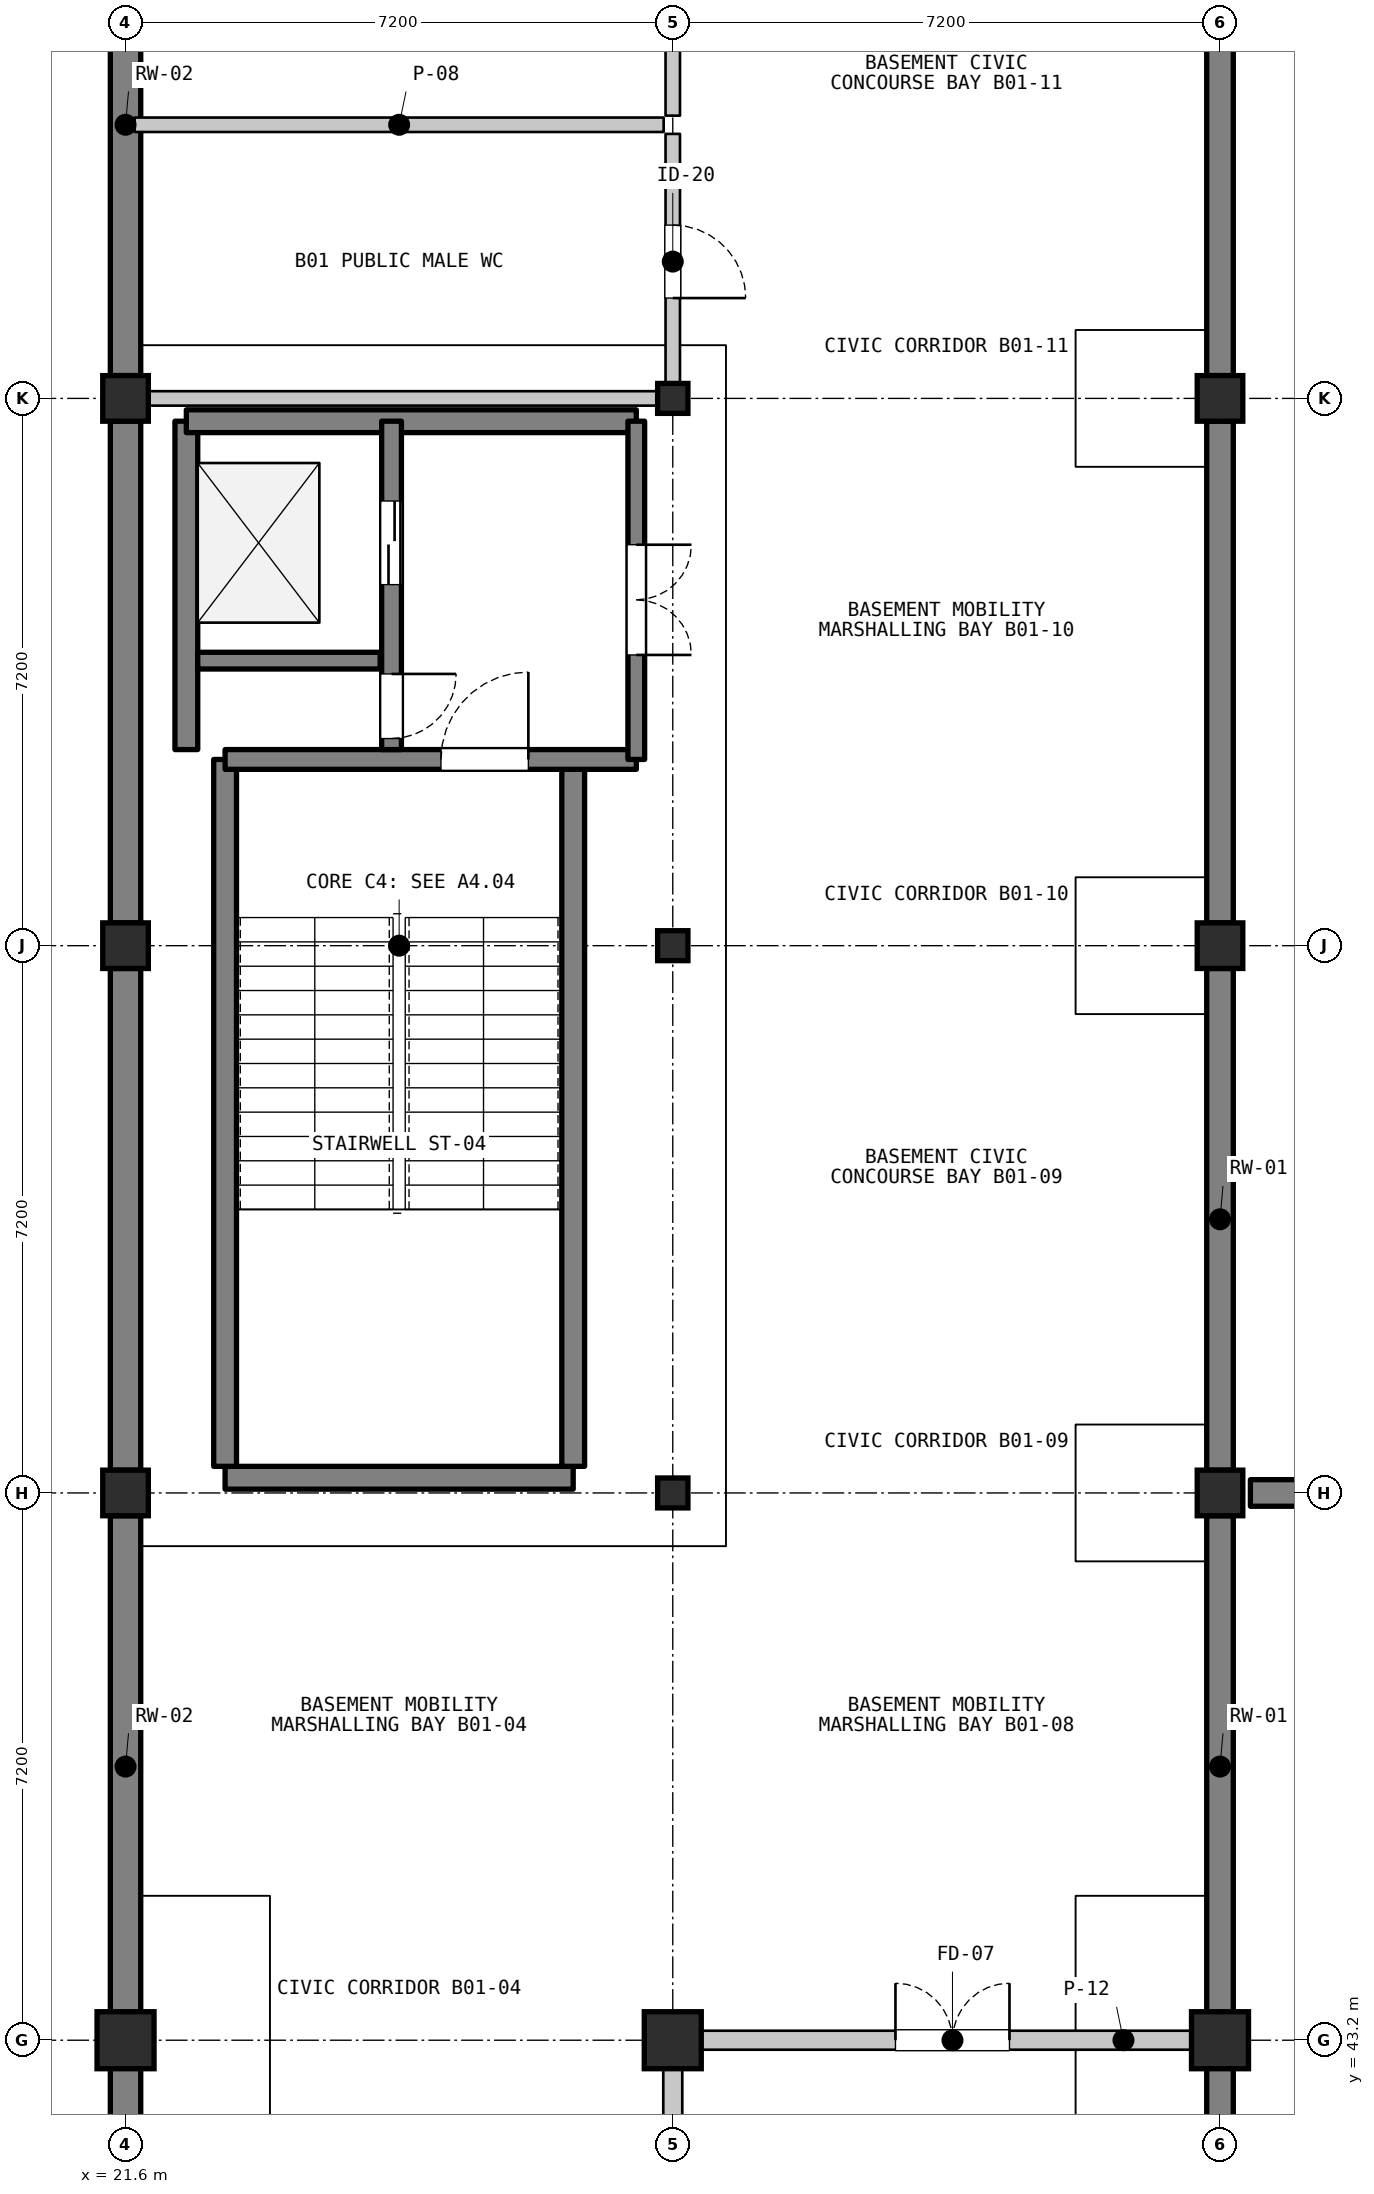
"""IFC4 building model, lengths in metres.
Left out: names, types, materials, properties, quantities, classifications, styles, units other than length and angle.
Written with IfcOpenShell. Run it as: python <this file> out.ifc"""

import sys

from ifc_helpers import new_model, si_unit, direction, frame, frame_2d, origin, origin_2d, place, context, subcontext, project, spatial, rectangle, i_section, extrude, element, fill, save


model = new_model("IFC4")
c1 = context("Model", 3, precision=1e-05, world=origin(), true_north=direction((0.0, 1.0)))
c2 = subcontext(c1, "Body", "Model", "MODEL_VIEW")
j1 = project(units=[si_unit("LENGTHUNIT", "METRE"), si_unit("PLANEANGLEUNIT", "RADIAN")], contexts=[c1])
p1 = place(None, origin())
s1 = spatial("IfcSite", under=j1, at=p1, CompositionType="ELEMENT")
p2 = place(p1, origin())
s2 = spatial("IfcBuilding", under=s1, at=p2, CompositionType="ELEMENT")
p3 = place(p2, frame((0.0, 0.0, -4.2)))
s3 = spatial("IfcBuildingStorey", under=s2, at=p3, CompositionType="ELEMENT", Elevation=-4.2)
p4 = place(p3, frame((21.6, 36.3, 0.0), z_axis=(0.0, 0.0, 1.0), x_axis=(0.0, 1.0, 0.0)))
e1 = element("IfcWall", 1, at=p4, inside=s3, PredefinedType="USERDEFINED", context=c2, shape_type="SweptSolid", body=[
    extrude(rectangle(XDim=6.6, YDim=0.4, at=frame_2d((3.3, 0.0))), origin(), (0.0, 0.0, 1.0), 3.98),
])
for number, where, z_axis, x_axis in (
    (2, (21.6, 43.5, 0.0), (0.0, 0.0, 1.0), (0.0, 1.0, 0.0)),
    (3, (21.6, 50.7, 0.0), (0.0, 0.0, 1.0), (0.0, 1.0, 0.0)),
    (4, (21.6, 57.9, 0.0), (0.0, 0.0, 1.0), (0.0, 1.0, 0.0)),
):
    element("IfcWall", number, at=place(p3, frame(where, z_axis=z_axis, x_axis=x_axis)), inside=s3, PredefinedType="USERDEFINED", context=c2, shape_type="SweptSolid", body=[
        extrude(rectangle(XDim=6.6, YDim=0.4, at=frame_2d((3.3, 0.0))), origin(), (0.0, 0.0, 1.0), 3.98),
    ])
p5 = place(p3, frame((21.6, 65.1, 0.0), z_axis=(0.0, 0.0, 1.0), x_axis=(0.0, 1.0, 0.0)))
e5 = element("IfcWall", 5, at=p5, inside=s3, PredefinedType="USERDEFINED", context=c2, shape_type="SweptSolid", body=[
    extrude(rectangle(XDim=6.6, YDim=0.4, at=frame_2d((3.3, 0.0))), origin(), (0.0, 0.0, 1.0), 3.98),
])
p6 = place(p3, frame((36.0, 36.3, 0.0), z_axis=(0.0, 0.0, 1.0), x_axis=(0.0, 1.0, 0.0)))
e6 = element("IfcWall", 6, at=p6, inside=s3, PredefinedType="USERDEFINED", context=c2, shape_type="SweptSolid", body=[
    extrude(rectangle(XDim=6.6, YDim=0.35, at=frame_2d((3.3, 0.0))), origin(), (0.0, 0.0, 1.0), 3.98),
])
for number, where, z_axis, x_axis in (
    (7, (36.0, 43.5, 0.0), (0.0, 0.0, 1.0), (0.0, 1.0, 0.0)),
    (8, (36.0, 50.7, 0.0), (0.0, 0.0, 1.0), (0.0, 1.0, 0.0)),
    (9, (36.0, 57.9, 0.0), (0.0, 0.0, 1.0), (0.0, 1.0, 0.0)),
):
    element("IfcWall", number, at=place(p3, frame(where, z_axis=z_axis, x_axis=x_axis)), inside=s3, PredefinedType="USERDEFINED", context=c2, shape_type="SweptSolid", body=[
        extrude(rectangle(XDim=6.6, YDim=0.35, at=frame_2d((3.3, 0.0))), origin(), (0.0, 0.0, 1.0), 3.98),
    ])
p7 = place(p3, frame((36.0, 65.1, 0.0), z_axis=(0.0, 0.0, 1.0), x_axis=(0.0, 1.0, 0.0)))
e10 = element("IfcWall", 10, at=p7, inside=s3, PredefinedType="USERDEFINED", context=c2, shape_type="SweptSolid", body=[
    extrude(rectangle(XDim=6.6, YDim=0.35, at=frame_2d((3.3, 0.0))), origin(), (0.0, 0.0, 1.0), 3.98),
])
p8 = place(p3, frame((36.4, 50.4, 0.0), z_axis=(0.0, 0.0, 1.0), x_axis=(1.0, 0.0, 0.0)))
e11 = element("IfcWall", 11, at=p8, inside=s3, PredefinedType="USERDEFINED", context=c2, shape_type="SweptSolid", body=[
    extrude(rectangle(XDim=6.4, YDim=0.35, at=frame_2d((3.2, 0.0))), origin(), (0.0, 0.0, 1.0), 3.98),
])
p9 = place(p3, frame((21.6, 43.2, 0.0), z_axis=(0.0, 0.0, 1.0), x_axis=(1.0, 0.0, 0.0)))
e12 = element("IfcColumn", 12, at=p9, inside=s3, PredefinedType="COLUMN", context=c2, shape_type="SweptSolid", body=[
    extrude(rectangle(XDim=0.75, YDim=0.75, at=origin_2d()), origin(), (0.0, 0.0, 1.0), 4.2),
])
for number, where, z_axis, x_axis in (
    (13, (21.6, 50.4, 0.0), (0.0, 0.0, 1.0), (1.0, 0.0, 0.0)),
    (14, (21.6, 57.6, 0.0), (0.0, 0.0, 1.0), (1.0, 0.0, 0.0)),
    (15, (21.6, 64.8, 0.0), (0.0, 0.0, 1.0), (1.0, 0.0, 0.0)),
):
    element("IfcColumn", number, at=place(p3, frame(where, z_axis=z_axis, x_axis=x_axis)), inside=s3, PredefinedType="COLUMN", context=c2, shape_type="SweptSolid", body=[
        extrude(rectangle(XDim=0.6, YDim=0.6, at=origin_2d()), origin(), (0.0, 0.0, 1.0), 4.2),
    ])
p10 = place(p3, frame((28.8, 43.2, 0.0), z_axis=(0.0, 0.0, 1.0), x_axis=(1.0, 0.0, 0.0)))
e16 = element("IfcColumn", 16, at=p10, inside=s3, PredefinedType="COLUMN", context=c2, shape_type="SweptSolid", body=[
    extrude(rectangle(XDim=0.75, YDim=0.75, at=origin_2d()), origin(), (0.0, 0.0, 1.0), 4.2),
])
for number, where, z_axis, x_axis in (
    (17, (28.8, 50.4, 0.0), (0.0, 0.0, 1.0), (1.0, 0.0, 0.0)),
    (18, (28.8, 57.6, 0.0), (0.0, 0.0, 1.0), (1.0, 0.0, 0.0)),
    (19, (28.8, 64.8, 0.0), (0.0, 0.0, 1.0), (1.0, 0.0, 0.0)),
):
    element("IfcColumn", number, at=place(p3, frame(where, z_axis=z_axis, x_axis=x_axis)), inside=s3, PredefinedType="COLUMN", context=c2, shape_type="SweptSolid", body=[
        extrude(i_section(OverallWidth=0.399, OverallDepth=0.394, WebThickness=0.023, FlangeThickness=0.037, FilletRadius=0.015, at=origin_2d()), origin(), (0.0, 0.0, 1.0), 4.2),
    ])
p11 = place(p3, frame((36.0, 43.2, 0.0), z_axis=(0.0, 0.0, 1.0), x_axis=(1.0, 0.0, 0.0)))
e20 = element("IfcColumn", 20, at=p11, inside=s3, PredefinedType="COLUMN", context=c2, shape_type="SweptSolid", body=[
    extrude(rectangle(XDim=0.75, YDim=0.75, at=origin_2d()), origin(), (0.0, 0.0, 1.0), 4.2),
])
for number, where, z_axis, x_axis in (
    (21, (36.0, 50.4, 0.0), (0.0, 0.0, 1.0), (1.0, 0.0, 0.0)),
    (22, (36.0, 57.6, 0.0), (0.0, 0.0, 1.0), (1.0, 0.0, 0.0)),
    (23, (36.0, 64.8, 0.0), (0.0, 0.0, 1.0), (1.0, 0.0, 0.0)),
):
    element("IfcColumn", number, at=place(p3, frame(where, z_axis=z_axis, x_axis=x_axis)), inside=s3, PredefinedType="COLUMN", context=c2, shape_type="SweptSolid", body=[
        extrude(rectangle(XDim=0.6, YDim=0.6, at=origin_2d()), origin(), (0.0, 0.0, 1.0), 4.2),
    ])
p12 = place(p3, frame((22.91, 50.6, 0.0), z_axis=(0.0, 0.0, 1.0), x_axis=(1.0, 0.0, 0.0)))
e24 = element("IfcWall", 24, at=p12, inside=s3, PredefinedType="SHEAR", context=c2, shape_type="SweptSolid", body=[
    extrude(rectangle(XDim=4.58, YDim=0.3, at=frame_2d((2.29, 0.0))), origin(), (0.0, 0.0, 1.0), 3.98),
])
for number, where, z_axis, x_axis in (
    (25, (22.91, 50.75, 0.0), (0.0, 0.0, 1.0), (0.0, 1.0, 0.0)),
    (26, (27.49, 50.75, 0.0), (0.0, 0.0, 1.0), (0.0, 1.0, 0.0)),
):
    element("IfcWall", number, at=place(p3, frame(where, z_axis=z_axis, x_axis=x_axis)), inside=s3, PredefinedType="SHEAR", context=c2, shape_type="SweptSolid", body=[
        extrude(rectangle(XDim=9.3, YDim=0.3, at=frame_2d((4.65, 0.0))), origin(), (0.0, 0.0, 1.0), 3.98),
    ])
p13 = place(p3, frame((22.91, 60.05, 0.0), z_axis=(0.0, 0.0, 1.0), x_axis=(1.0, 0.0, 0.0)))
e27 = element("IfcWall", 27, at=p13, inside=s3, PredefinedType="SHEAR", context=c2, shape_type="SweptSolid", body=[
    extrude(rectangle(XDim=5.41, YDim=0.26, at=frame_2d((2.705, 0.0))), origin(), (0.0, 0.0, 1.0), 3.98),
])
p14 = place(p13, frame((2.84, 0.0, 0.0)))
e28 = element("IfcOpeningElement", 28, at=p14, cuts=e27, PredefinedType="OPENING", context=c2, shape_type="SweptSolid", body=[
    extrude(rectangle(XDim=1.15, YDim=2.15, at=frame_2d((0.575, 1.075))), frame((0.0, 0.14, 0.0), z_axis=(0.0, -1.0, 0.0), x_axis=(1.0, 0.0, 0.0)), (0.0, 0.0, 1.0), 0.28),
])
p15 = place(p3, frame((22.4, 60.18, 0.0), z_axis=(0.0, 0.0, 1.0), x_axis=(0.0, 1.0, 0.0)))
e29 = element("IfcWall", 29, at=p15, inside=s3, PredefinedType="SHEAR", context=c2, shape_type="SweptSolid", body=[
    extrude(rectangle(XDim=4.32, YDim=0.3, at=frame_2d((2.16, 0.0))), origin(), (0.0, 0.0, 1.0), 3.98),
])
p16 = place(p3, frame((22.4, 64.5, 0.0), z_axis=(0.0, 0.0, 1.0), x_axis=(1.0, 0.0, 0.0)))
e30 = element("IfcWall", 30, at=p16, inside=s3, PredefinedType="SHEAR", context=c2, shape_type="SweptSolid", body=[
    extrude(rectangle(XDim=5.92, YDim=0.3, at=frame_2d((2.96, 0.0))), origin(), (0.0, 0.0, 1.0), 3.98),
])
p17 = place(p3, frame((22.55, 61.35, 0.0), z_axis=(0.0, 0.0, 1.0), x_axis=(1.0, 0.0, 0.0)))
e31 = element("IfcWall", 31, at=p17, inside=s3, PredefinedType="SHEAR", context=c2, shape_type="SweptSolid", body=[
    extrude(rectangle(XDim=2.4, YDim=0.22, at=frame_2d((1.2, 0.0))), origin(), (0.0, 0.0, 1.0), 3.98),
])
p18 = place(p3, frame((25.1, 64.5, 0.0), z_axis=(0.0, 0.0, 1.0), x_axis=(0.0, -1.0, 0.0)))
e32 = element("IfcWall", 32, at=p18, inside=s3, PredefinedType="SHEAR", context=c2, shape_type="SweptSolid", body=[
    extrude(rectangle(XDim=4.32, YDim=0.26, at=frame_2d((2.16, 0.0))), origin(), (0.0, 0.0, 1.0), 3.98),
])
p19 = place(p18, frame((1.05, 0.0, 0.0)))
e33 = element("IfcOpeningElement", 33, at=p19, cuts=e32, PredefinedType="OPENING", context=c2, shape_type="SweptSolid", body=[
    extrude(rectangle(XDim=1.1, YDim=2.15, at=frame_2d((0.55, 1.075))), frame((0.0, 0.14, 0.0), z_axis=(0.0, -1.0, 0.0), x_axis=(1.0, 0.0, 0.0)), (0.0, 0.0, 1.0), 0.28),
])
p20 = place(p18, frame((3.325, 0.0, 0.0)))
e34 = element("IfcOpeningElement", 34, at=p20, cuts=e32, PredefinedType="OPENING", context=c2, shape_type="SweptSolid", body=[
    extrude(rectangle(XDim=0.85, YDim=2.05, at=frame_2d((0.425, 1.025))), frame((0.0, 0.14, 0.0), z_axis=(0.0, -1.0, 0.0), x_axis=(1.0, 0.0, 0.0)), (0.0, 0.0, 1.0), 0.28),
])
p21 = place(p3, frame((28.32, 64.5, 0.0), z_axis=(0.0, 0.0, 1.0), x_axis=(0.0, -1.0, 0.0)))
e35 = element("IfcWall", 35, at=p21, inside=s3, PredefinedType="SHEAR", context=c2, shape_type="SweptSolid", body=[
    extrude(rectangle(XDim=4.45, YDim=0.22, at=frame_2d((2.225, 0.0))), origin(), (0.0, 0.0, 1.0), 3.98),
])
p22 = place(p21, frame((1.625, 0.0, 0.0)))
e36 = element("IfcOpeningElement", 36, at=p22, cuts=e35, PredefinedType="OPENING", context=c2, shape_type="SweptSolid", body=[
    extrude(rectangle(XDim=1.45, YDim=2.2, at=frame_2d((0.725, 1.1))), frame((0.0, 0.12, 0.0), z_axis=(0.0, -1.0, 0.0), x_axis=(1.0, 0.0, 0.0)), (0.0, 0.0, 1.0), 0.24),
])
p23 = place(p3, frame((28.8, 68.28, 0.0), z_axis=(0.0, 0.0, 1.0), x_axis=(0.0, -1.0, 0.0)))
e37 = element("IfcWall", 37, at=p23, inside=s3, PredefinedType="PARTITIONING", context=c2, shape_type="SweptSolid", body=[
    extrude(rectangle(XDim=3.36, YDim=0.19, at=frame_2d((1.68, 0.0))), origin(), (0.0, 0.0, 1.0), 3.368),
])
p24 = place(p23, frame((1.2, 0.0, 0.0)))
e38 = element("IfcOpeningElement", 38, at=p24, cuts=e37, PredefinedType="OPENING", context=c2, shape_type="SweptSolid", body=[
    extrude(rectangle(XDim=0.96, YDim=2.1, at=frame_2d((0.48, 1.05))), frame((0.0, 0.105, 0.0), z_axis=(0.0, -1.0, 0.0), x_axis=(1.0, 0.0, 0.0)), (0.0, 0.0, 1.0), 0.21),
])
p25 = place(p3, frame((28.68, 64.8, 0.0), z_axis=(0.0, 0.0, 1.0), x_axis=(-1.0, 0.0, 0.0)))
e39 = element("IfcWall", 39, at=p25, inside=s3, PredefinedType="PARTITIONING", context=c2, shape_type="SweptSolid", body=[
    extrude(rectangle(XDim=6.96, YDim=0.19, at=frame_2d((3.48, 0.0))), origin(), (0.0, 0.0, 1.0), 3.368),
])
p26 = place(p3, frame((21.72, 68.4, 0.0), z_axis=(0.0, 0.0, 1.0), x_axis=(1.0, 0.0, 0.0)))
e40 = element("IfcWall", 40, at=p26, inside=s3, PredefinedType="PARTITIONING", context=c2, shape_type="SweptSolid", body=[
    extrude(rectangle(XDim=6.96, YDim=0.19, at=frame_2d((3.48, 0.0))), origin(), (0.0, 0.0, 1.0), 3.437),
])
p27 = place(p3, frame((28.8, 71.88, 0.0), z_axis=(0.0, 0.0, 1.0), x_axis=(0.0, -1.0, 0.0)))
e41 = element("IfcWall", 41, at=p27, inside=s3, PredefinedType="PARTITIONING", context=c2, shape_type="SweptSolid", body=[
    extrude(rectangle(XDim=3.36, YDim=0.19, at=frame_2d((1.68, 0.0))), origin(), (0.0, 0.0, 1.0), 3.368),
])
p28 = place(p27, frame((1.22, 0.0, 0.0)))
e42 = element("IfcOpeningElement", 42, at=p28, cuts=e41, PredefinedType="OPENING", context=c2, shape_type="SweptSolid", body=[
    extrude(rectangle(XDim=0.92, YDim=2.1, at=frame_2d((0.46, 1.05))), frame((0.0, 0.105, 0.0), z_axis=(0.0, -1.0, 0.0), x_axis=(1.0, 0.0, 0.0)), (0.0, 0.0, 1.0), 0.21),
])
p29 = place(p3, frame((29.08, 43.2, 0.0), z_axis=(0.0, 0.0, 1.0), x_axis=(1.0, 0.0, 0.0)))
e43 = element("IfcWall", 43, at=p29, inside=s3, PredefinedType="PARTITIONING", context=c2, shape_type="SweptSolid", body=[
    extrude(rectangle(XDim=6.8, YDim=0.25, at=frame_2d((3.4, 0.0))), origin(), (0.0, 0.0, 1.0), 3.368),
])
p30 = place(p29, frame((2.65, 0.0, 0.0)))
e44 = element("IfcOpeningElement", 44, at=p30, cuts=e43, PredefinedType="OPENING", context=c2, shape_type="SweptSolid", body=[
    extrude(rectangle(XDim=1.5, YDim=2.25, at=frame_2d((0.75, 1.125))), frame((0.0, 0.135, 0.0), z_axis=(0.0, -1.0, 0.0), x_axis=(1.0, 0.0, 0.0)), (0.0, 0.0, 1.0), 0.27),
])
p31 = place(p3, frame((28.8, 36.12, 0.0), z_axis=(0.0, 0.0, 1.0), x_axis=(0.0, 1.0, 0.0)))
e45 = element("IfcWall", 45, at=p31, inside=s3, PredefinedType="PARTITIONING", context=c2, shape_type="SweptSolid", body=[
    extrude(rectangle(XDim=6.8, YDim=0.25, at=frame_2d((3.4, 0.0))), origin(), (0.0, 0.0, 1.0), 3.368),
])
p32 = place(p14, origin())
e46 = element("IfcDoor", 46, at=p32, inside=s3, OperationType="SINGLE_SWING_RIGHT", PredefinedType="DOOR", context=c2, shape_type="SweptSolid", body=[
    extrude(rectangle(XDim=1.15, YDim=2.15, at=frame_2d((0.575, 1.075))), frame((0.0, 0.025, 0.0), z_axis=(0.0, -1.0, 0.0), x_axis=(1.0, 0.0, 0.0)), (0.0, 0.0, 1.0), 0.05),
])
fill(e28, e46)
p33 = place(p19, origin())
e47 = element("IfcDoor", 47, at=p33, inside=s3, OperationType="DOUBLE_DOOR_SLIDING", PredefinedType="DOOR", context=c2, shape_type="SweptSolid", body=[
    extrude(rectangle(XDim=1.1, YDim=2.15, at=frame_2d((0.55, 1.075))), frame((0.0, 0.025, 0.0), z_axis=(0.0, -1.0, 0.0), x_axis=(1.0, 0.0, 0.0)), (0.0, 0.0, 1.0), 0.05),
])
fill(e33, e47)
p34 = place(p20, origin())
e48 = element("IfcDoor", 48, at=p34, inside=s3, OperationType="SINGLE_SWING_LEFT", PredefinedType="DOOR", context=c2, shape_type="SweptSolid", body=[
    extrude(rectangle(XDim=0.85, YDim=2.05, at=frame_2d((0.425, 1.025))), frame((0.0, 0.025, 0.0), z_axis=(0.0, -1.0, 0.0), x_axis=(1.0, 0.0, 0.0)), (0.0, 0.0, 1.0), 0.05),
])
fill(e34, e48)
p35 = place(p22, origin())
e49 = element("IfcDoor", 49, at=p35, inside=s3, OperationType="DOUBLE_DOOR_SINGLE_SWING", PredefinedType="DOOR", context=c2, shape_type="SweptSolid", body=[
    extrude(rectangle(XDim=1.45, YDim=2.2, at=frame_2d((0.725, 1.1))), frame((0.0, 0.025, 0.0), z_axis=(0.0, -1.0, 0.0), x_axis=(1.0, 0.0, 0.0)), (0.0, 0.0, 1.0), 0.05),
])
fill(e36, e49)
p36 = place(p24, origin())
e50 = element("IfcDoor", 50, at=p36, inside=s3, OperationType="SINGLE_SWING_RIGHT", PredefinedType="DOOR", context=c2, shape_type="SweptSolid", body=[
    extrude(rectangle(XDim=0.96, YDim=2.1, at=frame_2d((0.48, 1.05))), frame((0.0, 0.025, 0.0), z_axis=(0.0, -1.0, 0.0), x_axis=(1.0, 0.0, 0.0)), (0.0, 0.0, 1.0), 0.05),
])
fill(e38, e50)
p37 = place(p30, origin())
e51 = element("IfcDoor", 51, at=p37, inside=s3, OperationType="DOUBLE_DOOR_SINGLE_SWING", PredefinedType="DOOR", context=c2, shape_type="SweptSolid", body=[
    extrude(rectangle(XDim=1.5, YDim=2.25, at=frame_2d((0.75, 1.125))), frame((0.0, 0.025, 0.0), z_axis=(0.0, -1.0, 0.0), x_axis=(1.0, 0.0, 0.0)), (0.0, 0.0, 1.0), 0.05),
])
fill(e44, e51)
save(model, sys.argv[1])
